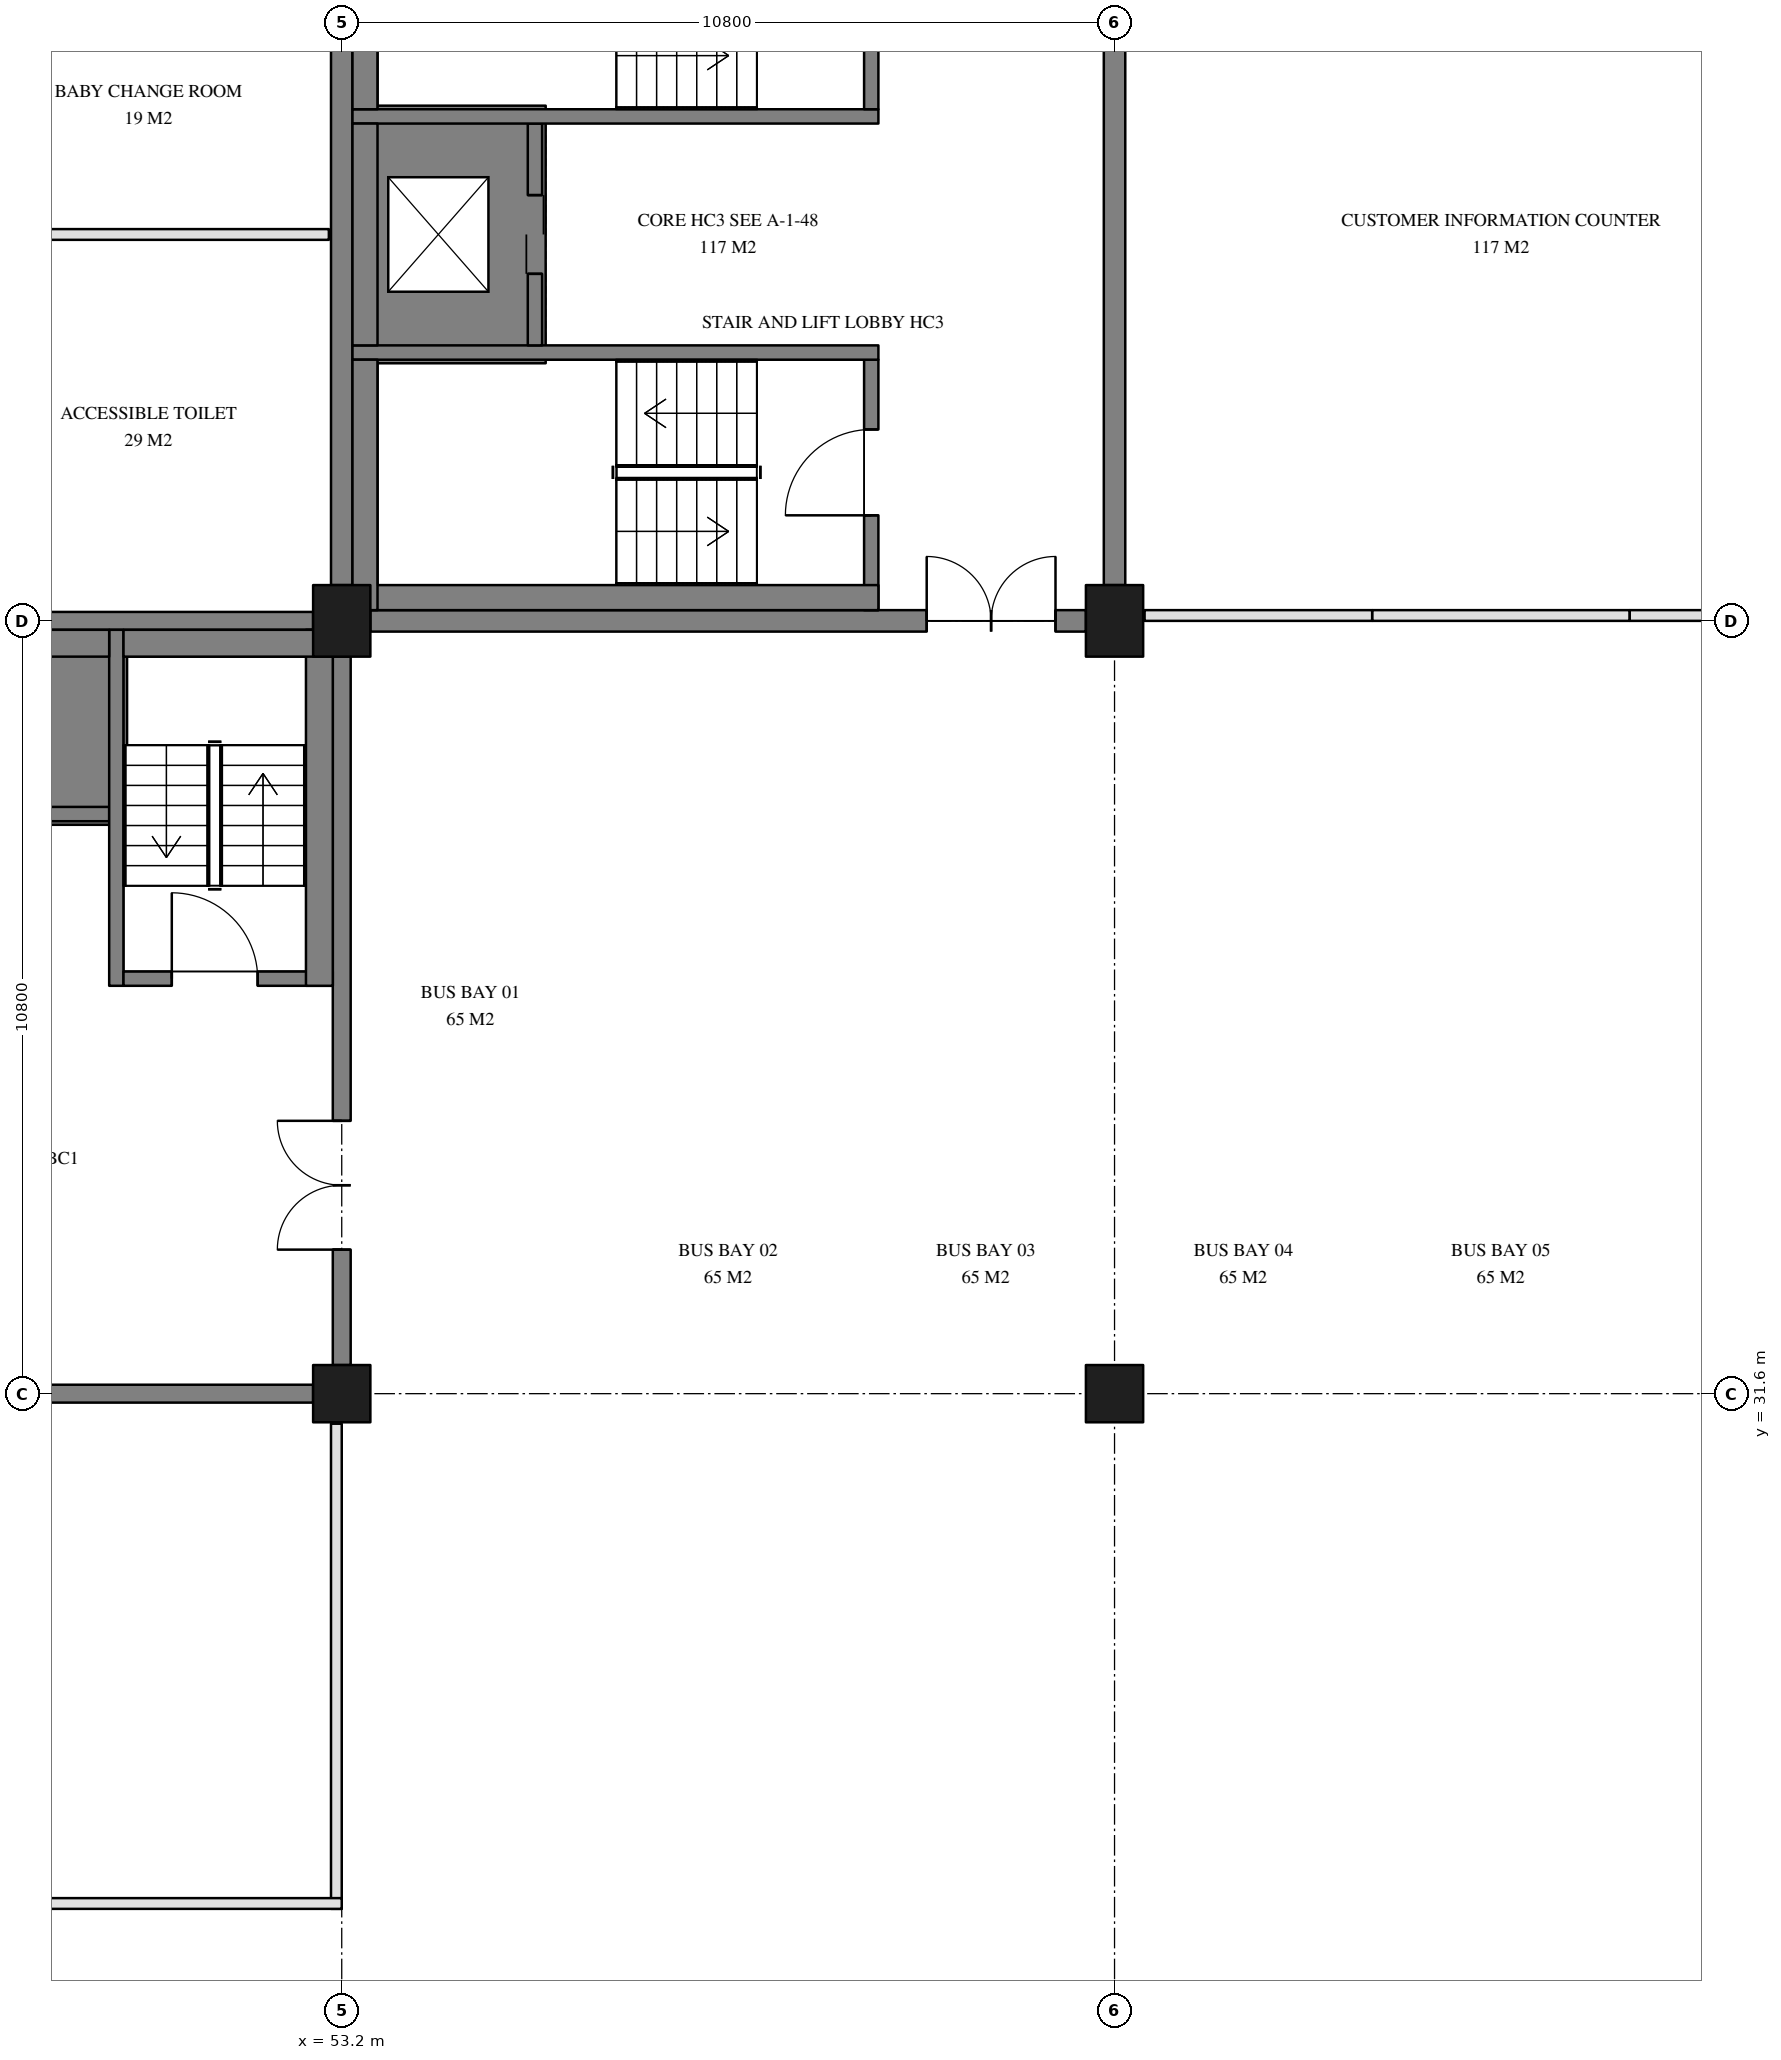
"""IFC4 building model, lengths in metres.
Left out: names, types, materials, properties, quantities, classifications, styles, units other than length and angle.
Written with IfcOpenShell. Run it as: python <this file> out.ifc"""

import sys

from ifc_helpers import new_model, si_unit, direction, frame, frame_2d, origin, origin_2d, place, context, subcontext, project, spatial, polyline, rectangle, outline, extrude, element, fill, save


model = new_model("IFC4")
c1 = context("Model", 3, precision=1e-05, world=origin(), true_north=direction((0.0, 1.0)))
c2 = subcontext(c1, "Body", "Model", "MODEL_VIEW")
j1 = project(units=[si_unit("LENGTHUNIT", "METRE"), si_unit("PLANEANGLEUNIT", "RADIAN")], contexts=[c1])
p1 = place(None, origin())
s1 = spatial("IfcSite", under=j1, at=p1, CompositionType="ELEMENT")
p2 = place(p1, origin())
s2 = spatial("IfcBuilding", under=s1, at=p2, CompositionType="ELEMENT")
p3 = place(p2, frame((0.0, 0.0, -5.4)))
s3 = spatial("IfcBuildingStorey", under=s2, at=p3, CompositionType="ELEMENT", Elevation=-5.4)
for number, where, z_axis, x_axis in (
    (1, (53.2, 42.4, -0.4), (0.0, 0.0, 1.0), (1.0, 0.0, 0.0)),
    (2, (64.0, 42.4, -0.4), (0.0, 0.0, 1.0), (1.0, 0.0, 0.0)),
):
    element("IfcColumn", number, at=place(p3, frame(where, z_axis=z_axis, x_axis=x_axis)), inside=s3, PredefinedType="COLUMN", context=c2, shape_type="SweptSolid", body=[
        extrude(rectangle(XDim=0.8, YDim=1.0, at=origin_2d()), origin(), (0.0, 0.0, 1.0), 5.8),
    ])
for number, where, z_axis, x_axis in (
    (3, (53.2, 31.6, -0.4), (0.0, 0.0, 1.0), (1.0, 0.0, 0.0)),
    (4, (64.0, 31.6, -0.4), (0.0, 0.0, 1.0), (1.0, 0.0, 0.0)),
):
    element("IfcColumn", number, at=place(p3, frame(where, z_axis=z_axis, x_axis=x_axis)), inside=s3, PredefinedType="COLUMN", context=c2, shape_type="SweptSolid", body=[
        extrude(rectangle(XDim=0.8, YDim=0.8, at=origin_2d()), origin(), (0.0, 0.0, 1.0), 5.8),
    ])
p4 = place(p3, frame((0.0, 0.0, -1.4)))
e5 = element("IfcWall", 5, at=p4, inside=s3, PredefinedType="SOLIDWALL", context=c2, shape_type="SweptSolid", body=[
    extrude(outline(polyline([(45.4, 39.55), (50.2, 39.55), (50.2, 42.15), (45.4, 42.15), (45.4, 39.55)]), holes=[polyline([(49.95, 39.8), (49.95, 41.9), (45.65, 41.9), (45.65, 39.8), (49.95, 39.8)])]), origin(), (0.0, 0.0, 1.0), 1.4),
])
p5 = place(p3, frame((0.0, 0.0, -1.4)))
e6 = element("IfcWall", 6, at=p5, inside=s3, PredefinedType="SOLIDWALL", context=c2, shape_type="SweptSolid", body=[
    extrude(outline(polyline([(56.05, 46.0), (56.05, 49.6), (53.45, 49.6), (53.45, 46.0), (56.05, 46.0)]), holes=[polyline([(55.8, 49.35), (53.7, 49.35), (53.7, 46.25), (55.8, 46.25), (55.8, 49.35)])]), origin(), (0.0, 0.0, 1.0), 1.4),
])
p6 = place(p3, frame((53.6, 42.4, 0.0), z_axis=(0.0, 0.0, 1.0), x_axis=(1.0, 0.0, 0.0)))
e7 = element("IfcWall", 7, at=p6, inside=s3, PredefinedType="SOLIDWALL", context=c2, shape_type="SweptSolid", body=[
    extrude(rectangle(XDim=10.0, YDim=0.3, at=frame_2d((5.0, 0.0))), origin(), (0.0, 0.0, 1.0), 5.4),
])
p7 = place(p6, frame((7.775, 0.0, 0.0)))
e8 = element("IfcOpeningElement", 8, at=p7, cuts=e7, PredefinedType="OPENING", context=c2, shape_type="SweptSolid", body=[
    extrude(rectangle(XDim=1.8, YDim=2.1, at=frame_2d((0.9, 1.05))), frame((0.0, 0.16, 0.0), z_axis=(0.0, -1.0, 0.0), x_axis=(1.0, 0.0, 0.0)), (0.0, 0.0, 1.0), 0.32),
])
for number, where, z_axis, x_axis in (
    (9, (64.0, 42.9, 0.0), (0.0, 0.0, 1.0), (0.0, 1.0, 0.0)),
    (10, (53.2, 52.7, 0.0), (0.0, 0.0, 1.0), (0.0, -1.0, 0.0)),
):
    element("IfcWall", number, at=place(p3, frame(where, z_axis=z_axis, x_axis=x_axis)), inside=s3, PredefinedType="SOLIDWALL", context=c2, shape_type="SweptSolid", body=[
        extrude(rectangle(XDim=9.8, YDim=0.3, at=frame_2d((4.9, 0.0))), origin(), (0.0, 0.0, 1.0), 5.4),
    ])
p8 = place(p3, frame((42.8, 31.6, 0.0), z_axis=(0.0, 0.0, 1.0), x_axis=(1.0, 0.0, 0.0)))
e11 = element("IfcWall", 11, at=p8, inside=s3, PredefinedType="SOLIDWALL", context=c2, shape_type="SweptSolid", body=[
    extrude(rectangle(XDim=10.0, YDim=0.25, at=frame_2d((5.0, 0.0))), origin(), (0.0, 0.0, 1.0), 5.4),
])
p9 = place(p3, frame((53.2, 32.0, 0.0), z_axis=(0.0, 0.0, 1.0), x_axis=(0.0, 1.0, 0.0)))
e12 = element("IfcWall", 12, at=p9, inside=s3, PredefinedType="SOLIDWALL", context=c2, shape_type="SweptSolid", body=[
    extrude(rectangle(XDim=9.9, YDim=0.25, at=frame_2d((4.95, 0.0))), origin(), (0.0, 0.0, 1.0), 5.4),
])
p10 = place(p9, frame((1.613, 0.0, 0.0)))
e13 = element("IfcOpeningElement", 13, at=p10, cuts=e12, PredefinedType="OPENING", context=c2, shape_type="SweptSolid", body=[
    extrude(rectangle(XDim=1.8, YDim=2.1, at=frame_2d((0.9, 1.05))), frame((0.0, 0.135, 0.0), z_axis=(0.0, -1.0, 0.0), x_axis=(1.0, 0.0, 0.0)), (0.0, 0.0, 1.0), 0.27),
])
p11 = place(p3, frame((52.8, 42.4, 0.0), z_axis=(0.0, 0.0, 1.0), x_axis=(-1.0, 0.0, 0.0)))
e14 = element("IfcWall", 14, at=p11, inside=s3, PredefinedType="SOLIDWALL", context=c2, shape_type="SweptSolid", body=[
    extrude(rectangle(XDim=10.0, YDim=0.25, at=frame_2d((5.0, 0.0))), origin(), (0.0, 0.0, 1.0), 5.4),
])
p12 = place(p3, frame((60.6, 42.55, 0.0), z_axis=(0.0, 0.0, 1.0), x_axis=(0.0, 1.0, 0.0)))
e15 = element("IfcWall", 15, at=p12, inside=s3, PredefinedType="SOLIDWALL", context=c2, shape_type="SweptSolid", body=[
    extrude(rectangle(XDim=3.5, YDim=0.2, at=frame_2d((1.75, 0.0))), origin(), (0.0, 0.0, 1.0), 4.8),
])
p13 = place(p12, frame((1.325, 0.0, 0.0)))
e16 = element("IfcOpeningElement", 16, at=p13, cuts=e15, PredefinedType="OPENING", context=c2, shape_type="SweptSolid", body=[
    extrude(rectangle(XDim=1.2, YDim=2.1, at=frame_2d((0.6, 1.05))), frame((0.0, 0.11, 0.0), z_axis=(0.0, -1.0, 0.0), x_axis=(1.0, 0.0, 0.0)), (0.0, 0.0, 1.0), 0.22),
])
p14 = place(p3, frame((60.7, 46.15, 0.0), z_axis=(0.0, 0.0, 1.0), x_axis=(-1.0, 0.0, 0.0)))
e17 = element("IfcWall", 17, at=p14, inside=s3, PredefinedType="SOLIDWALL", context=c2, shape_type="SweptSolid", body=[
    extrude(rectangle(XDim=7.35, YDim=0.2, at=frame_2d((3.675, 0.0))), origin(), (0.0, 0.0, 1.0), 4.8),
])
p15 = place(p3, frame((55.9, 46.25, 0.0), z_axis=(0.0, 0.0, 1.0), x_axis=(0.0, 1.0, 0.0)))
e18 = element("IfcWall", 18, at=p15, inside=s3, PredefinedType="SOLIDWALL", context=c2, shape_type="SweptSolid", body=[
    extrude(rectangle(XDim=3.1, YDim=0.2, at=frame_2d((1.55, 0.0))), origin(), (0.0, 0.0, 1.0), 4.8),
])
p16 = place(p15, frame((1.0, 0.0, 0.0)))
e19 = element("IfcOpeningElement", 19, at=p16, cuts=e18, PredefinedType="OPENING", context=c2, shape_type="SweptSolid", body=[
    extrude(rectangle(XDim=1.1, YDim=2.1, at=frame_2d((0.55, 1.05))), frame((0.0, 0.11, 0.0), z_axis=(0.0, -1.0, 0.0), x_axis=(1.0, 0.0, 0.0)), (0.0, 0.0, 1.0), 0.22),
])
p17 = place(p3, frame((60.7, 49.45, 0.0), z_axis=(0.0, 0.0, 1.0), x_axis=(-1.0, 0.0, 0.0)))
e20 = element("IfcWall", 20, at=p17, inside=s3, PredefinedType="SOLIDWALL", context=c2, shape_type="SweptSolid", body=[
    extrude(rectangle(XDim=7.35, YDim=0.2, at=frame_2d((3.675, 0.0))), origin(), (0.0, 0.0, 1.0), 4.8),
])
p18 = place(p3, frame((60.6, 49.55, 0.0), z_axis=(0.0, 0.0, 1.0), x_axis=(0.0, 1.0, 0.0)))
e21 = element("IfcWall", 21, at=p18, inside=s3, PredefinedType="SOLIDWALL", context=c2, shape_type="SweptSolid", body=[
    extrude(rectangle(XDim=3.5, YDim=0.2, at=frame_2d((1.75, 0.0))), origin(), (0.0, 0.0, 1.0), 4.8),
])
p19 = place(p18, frame((0.975, 0.0, 0.0)))
e22 = element("IfcOpeningElement", 22, at=p19, cuts=e21, PredefinedType="OPENING", context=c2, shape_type="SweptSolid", body=[
    extrude(rectangle(XDim=1.2, YDim=2.1, at=frame_2d((0.6, 1.05))), frame((0.0, 0.11, 0.0), z_axis=(0.0, -1.0, 0.0), x_axis=(1.0, 0.0, 0.0)), (0.0, 0.0, 1.0), 0.22),
])
p20 = place(p3, frame((60.7, 42.725, 0.0), z_axis=(0.0, 0.0, 1.0), x_axis=(-1.0, 0.0, 0.0)))
e23 = element("IfcWall", 23, at=p20, inside=s3, PredefinedType="SOLIDWALL", context=c2, shape_type="SweptSolid", body=[
    extrude(rectangle(XDim=7.35, YDim=0.35, at=frame_2d((3.675, 0.0))), origin(), (0.0, 0.0, 1.0), 4.8),
])
for number, where, z_axis, x_axis in (
    (24, (53.525, 42.55, 0.0), (0.0, 0.0, 1.0), (0.0, 1.0, 0.0)),
    (25, (53.525, 49.55, 0.0), (0.0, 0.0, 1.0), (0.0, 1.0, 0.0)),
):
    element("IfcWall", number, at=place(p3, frame(where, z_axis=z_axis, x_axis=x_axis)), inside=s3, PredefinedType="SOLIDWALL", context=c2, shape_type="SweptSolid", body=[
        extrude(rectangle(XDim=3.5, YDim=0.35, at=frame_2d((1.75, 0.0))), origin(), (0.0, 0.0, 1.0), 4.8),
    ])
p21 = place(p3, frame((53.525, 46.25, 0.0), z_axis=(0.0, 0.0, 1.0), x_axis=(0.0, 1.0, 0.0)))
e26 = element("IfcWall", 26, at=p21, inside=s3, PredefinedType="SOLIDWALL", context=c2, shape_type="SweptSolid", body=[
    extrude(rectangle(XDim=3.1, YDim=0.35, at=frame_2d((1.55, 0.0))), origin(), (0.0, 0.0, 1.0), 4.8),
])
p22 = place(p3, frame((45.65, 39.7, 0.0), z_axis=(0.0, 0.0, 1.0), x_axis=(1.0, 0.0, 0.0)))
e27 = element("IfcWall", 27, at=p22, inside=s3, PredefinedType="SOLIDWALL", context=c2, shape_type="SweptSolid", body=[
    extrude(rectangle(XDim=4.3, YDim=0.2, at=frame_2d((2.15, 0.0))), origin(), (0.0, 0.0, 1.0), 4.8),
])
p23 = place(p22, frame((1.6, 0.0, 0.0)))
e28 = element("IfcOpeningElement", 28, at=p23, cuts=e27, PredefinedType="OPENING", context=c2, shape_type="SweptSolid", body=[
    extrude(rectangle(XDim=1.1, YDim=2.1, at=frame_2d((0.55, 1.05))), frame((0.0, 0.11, 0.0), z_axis=(0.0, -1.0, 0.0), x_axis=(1.0, 0.0, 0.0)), (0.0, 0.0, 1.0), 0.22),
])
p24 = place(p3, frame((50.05, 37.3, 0.0), z_axis=(0.0, 0.0, 1.0), x_axis=(0.0, 1.0, 0.0)))
e29 = element("IfcWall", 29, at=p24, inside=s3, PredefinedType="SOLIDWALL", context=c2, shape_type="SweptSolid", body=[
    extrude(rectangle(XDim=4.975, YDim=0.2, at=frame_2d((2.487, 0.0))), origin(), (0.0, 0.0, 1.0), 4.8),
])
p25 = place(p3, frame((50.15, 37.4, 0.0), z_axis=(0.0, 0.0, 1.0), x_axis=(1.0, 0.0, 0.0)))
e30 = element("IfcWall", 30, at=p25, inside=s3, PredefinedType="SOLIDWALL", context=c2, shape_type="SweptSolid", body=[
    extrude(rectangle(XDim=2.925, YDim=0.2, at=frame_2d((1.462, 0.0))), origin(), (0.0, 0.0, 1.0), 4.8),
])
p26 = place(p25, frame((0.675, 0.0, 0.0)))
e31 = element("IfcOpeningElement", 31, at=p26, cuts=e30, PredefinedType="OPENING", context=c2, shape_type="SweptSolid", body=[
    extrude(rectangle(XDim=1.2, YDim=2.1, at=frame_2d((0.6, 1.05))), frame((0.0, 0.11, 0.0), z_axis=(0.0, -1.0, 0.0), x_axis=(1.0, 0.0, 0.0)), (0.0, 0.0, 1.0), 0.22),
])
p27 = place(p3, frame((52.887, 37.3, 0.0), z_axis=(0.0, 0.0, 1.0), x_axis=(0.0, 1.0, 0.0)))
e32 = element("IfcWall", 32, at=p27, inside=s3, PredefinedType="SOLIDWALL", context=c2, shape_type="SweptSolid", body=[
    extrude(rectangle(XDim=4.975, YDim=0.375, at=frame_2d((2.487, 0.0))), origin(), (0.0, 0.0, 1.0), 4.8),
])
p28 = place(p3, frame((50.15, 42.087, 0.0), z_axis=(0.0, 0.0, 1.0), x_axis=(1.0, 0.0, 0.0)))
e33 = element("IfcWall", 33, at=p28, inside=s3, PredefinedType="SOLIDWALL", context=c2, shape_type="SweptSolid", body=[
    extrude(rectangle(XDim=2.925, YDim=0.375, at=frame_2d((1.462, 0.0))), origin(), (0.0, 0.0, 1.0), 4.8),
])
p29 = place(p3, frame((45.65, 42.087, 0.0), z_axis=(0.0, 0.0, 1.0), x_axis=(1.0, 0.0, 0.0)))
e34 = element("IfcWall", 34, at=p29, inside=s3, PredefinedType="SOLIDWALL", context=c2, shape_type="SweptSolid", body=[
    extrude(rectangle(XDim=4.3, YDim=0.375, at=frame_2d((2.15, 0.0))), origin(), (0.0, 0.0, 1.0), 4.8),
])
p30 = place(p3, frame((47.8, 47.8, 0.0), z_axis=(0.0, 0.0, 1.0), x_axis=(1.0, 0.0, 0.0)))
e35 = element("IfcWall", 35, at=p30, inside=s3, PredefinedType="PARTITIONING", context=c2, shape_type="SweptSolid", body=[
    extrude(rectangle(XDim=5.22, YDim=0.15, at=frame_2d((2.61, 0.0))), origin(), (0.0, 0.0, 1.0), 4.8),
])
p31 = place(p3, frame((67.6, 42.475, 0.0), z_axis=(0.0, 0.0, 1.0), x_axis=(1.0, 0.0, 0.0)))
e36 = element("IfcWall", 36, at=p31, inside=s3, PredefinedType="PARTITIONING", context=c2, shape_type="SweptSolid", body=[
    extrude(rectangle(XDim=3.6, YDim=0.15, at=frame_2d((1.8, 0.0))), origin(), (0.0, 0.0, 1.0), 3.8),
])
p32 = place(p3, frame((71.2, 42.475, 0.0), z_axis=(0.0, 0.0, 1.0), x_axis=(1.0, 0.0, 0.0)))
e37 = element("IfcWall", 37, at=p32, inside=s3, PredefinedType="PARTITIONING", context=c2, shape_type="SweptSolid", body=[
    extrude(rectangle(XDim=3.18, YDim=0.15, at=frame_2d((1.59, 0.0))), origin(), (0.0, 0.0, 1.0), 3.8),
])
p33 = place(p3, frame((64.42, 42.475, 0.0), z_axis=(0.0, 0.0, 1.0), x_axis=(1.0, 0.0, 0.0)))
e38 = element("IfcWall", 38, at=p33, inside=s3, PredefinedType="PARTITIONING", context=c2, shape_type="SweptSolid", body=[
    extrude(rectangle(XDim=3.18, YDim=0.15, at=frame_2d((1.59, 0.0))), origin(), (0.0, 0.0, 1.0), 3.8),
])
p34 = place(p3, frame((53.125, 24.4, 0.0), z_axis=(0.0, 0.0, 1.0), x_axis=(0.0, 1.0, 0.0)))
e39 = element("IfcWall", 39, at=p34, inside=s3, PredefinedType="PARTITIONING", context=c2, shape_type="SweptSolid", body=[
    extrude(rectangle(XDim=6.78, YDim=0.15, at=frame_2d((3.39, 0.0))), origin(), (0.0, 0.0, 1.0), 3.8),
])
p35 = place(p3, frame((42.4, 24.475, 0.0), z_axis=(0.0, 0.0, 1.0), x_axis=(1.0, 0.0, 0.0)))
e40 = element("IfcWall", 40, at=p35, inside=s3, PredefinedType="PARTITIONING", context=c2, shape_type="SweptSolid", body=[
    extrude(rectangle(XDim=10.8, YDim=0.15, at=frame_2d((5.4, 0.0))), origin(), (0.0, 0.0, 1.0), 3.8),
])
p36 = place(p35, frame((4.9, 0.0, 0.0)))
e41 = element("IfcOpeningElement", 41, at=p36, cuts=e40, PredefinedType="OPENING", context=c2, shape_type="SweptSolid", body=[
    extrude(rectangle(XDim=1.0, YDim=2.1, at=frame_2d((0.5, 1.05))), frame((0.0, 0.085, 0.0), z_axis=(0.0, -1.0, 0.0), x_axis=(1.0, 0.0, 0.0)), (0.0, 0.0, 1.0), 0.17),
])
p37 = place(p16, frame((1.1, 0.0, 0.0), z_axis=(0.0, 0.0, 1.0), x_axis=(-1.0, 0.0, 0.0)))
e42 = element("IfcDoor", 42, at=p37, inside=s3, OperationType="DOUBLE_DOOR_SLIDING", PredefinedType="DOOR", context=c2, shape_type="SweptSolid", body=[
    extrude(rectangle(XDim=1.1, YDim=2.1, at=frame_2d((0.55, 1.05))), frame((0.0, 0.025, 0.0), z_axis=(0.0, -1.0, 0.0), x_axis=(1.0, 0.0, 0.0)), (0.0, 0.0, 1.0), 0.05),
])
fill(e19, e42)
p38 = place(p13, frame((1.2, 0.0, 0.0), z_axis=(0.0, 0.0, 1.0), x_axis=(-1.0, 0.0, 0.0)))
e43 = element("IfcDoor", 43, at=p38, inside=s3, OperationType="SINGLE_SWING_LEFT", PredefinedType="DOOR", context=c2, shape_type="SweptSolid", body=[
    extrude(rectangle(XDim=1.2, YDim=2.1, at=frame_2d((0.6, 1.05))), frame((0.0, 0.025, 0.0), z_axis=(0.0, -1.0, 0.0), x_axis=(1.0, 0.0, 0.0)), (0.0, 0.0, 1.0), 0.05),
])
fill(e16, e43)
p39 = place(p7, frame((1.8, 0.0, 0.0), z_axis=(0.0, 0.0, 1.0), x_axis=(-1.0, 0.0, 0.0)))
e44 = element("IfcDoor", 44, at=p39, inside=s3, OperationType="DOUBLE_DOOR_DOUBLE_SWING", PredefinedType="DOOR", context=c2, shape_type="SweptSolid", body=[
    extrude(rectangle(XDim=1.8, YDim=2.1, at=frame_2d((0.9, 1.05))), frame((0.0, 0.025, 0.0), z_axis=(0.0, -1.0, 0.0), x_axis=(1.0, 0.0, 0.0)), (0.0, 0.0, 1.0), 0.05),
])
fill(e8, e44)
p40 = place(p26, frame((1.2, 0.0, 0.0), z_axis=(0.0, 0.0, 1.0), x_axis=(-1.0, 0.0, 0.0)))
e45 = element("IfcDoor", 45, at=p40, inside=s3, OperationType="SINGLE_SWING_RIGHT", PredefinedType="DOOR", context=c2, shape_type="SweptSolid", body=[
    extrude(rectangle(XDim=1.2, YDim=2.1, at=frame_2d((0.6, 1.05))), frame((0.0, 0.025, 0.0), z_axis=(0.0, -1.0, 0.0), x_axis=(1.0, 0.0, 0.0)), (0.0, 0.0, 1.0), 0.05),
])
fill(e31, e45)
p41 = place(p10, frame((1.8, 0.0, 0.0), z_axis=(0.0, 0.0, 1.0), x_axis=(-1.0, 0.0, 0.0)))
e46 = element("IfcDoor", 46, at=p41, inside=s3, OperationType="DOUBLE_DOOR_DOUBLE_SWING", PredefinedType="DOOR", context=c2, shape_type="SweptSolid", body=[
    extrude(rectangle(XDim=1.8, YDim=2.1, at=frame_2d((0.9, 1.05))), frame((0.0, 0.025, 0.0), z_axis=(0.0, -1.0, 0.0), x_axis=(1.0, 0.0, 0.0)), (0.0, 0.0, 1.0), 0.05),
])
fill(e13, e46)
save(model, sys.argv[1])
